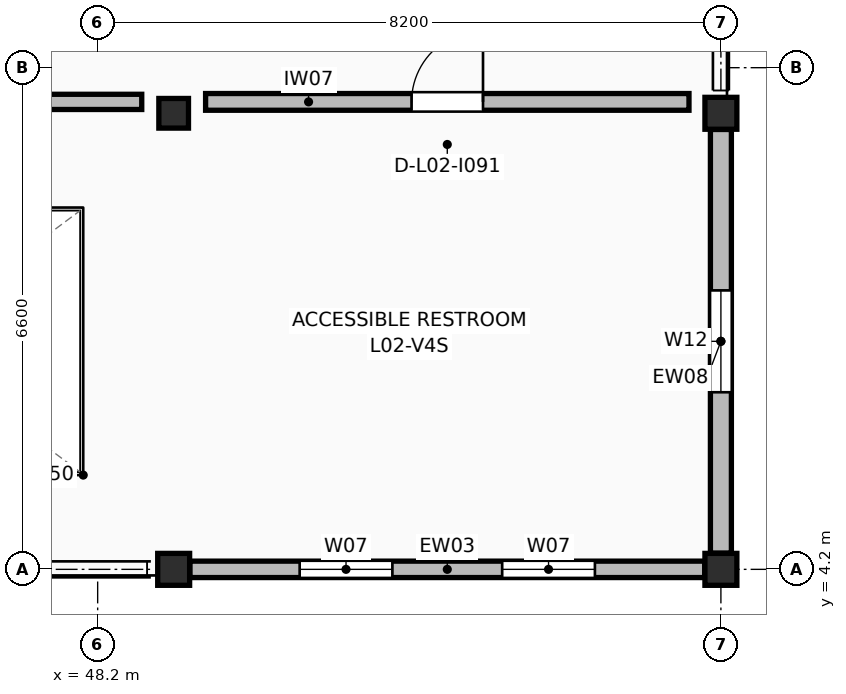
"""IFC4 building model, lengths in metres.
Left out: names, types, materials, properties, quantities, classifications, styles, units other than length and angle.
Written with IfcOpenShell. Run it as: python <this file> out.ifc"""

import sys

from ifc_helpers import new_model, si_unit, direction, frame, frame_2d, origin, origin_2d, place, context, subcontext, project, spatial, rectangle, extrude, element, fill, save


model = new_model("IFC4")
c1 = context("Model", 3, precision=1e-05, world=origin(), true_north=direction((0.0, 1.0)))
c2 = subcontext(c1, "Body", "Model", "MODEL_VIEW")
j1 = project(units=[si_unit("LENGTHUNIT", "METRE"), si_unit("PLANEANGLEUNIT", "RADIAN")], contexts=[c1])
p1 = place(None, origin())
s1 = spatial("IfcSite", under=j1, at=p1, CompositionType="ELEMENT")
p2 = place(p1, origin())
s2 = spatial("IfcBuilding", under=s1, at=p2, CompositionType="ELEMENT")
p3 = place(p2, frame((0.0, 0.0, 8.16)))
s3 = spatial("IfcBuildingStorey", under=s2, at=p3, CompositionType="ELEMENT", Elevation=8.16)
p4 = place(p3, frame((49.2, 4.2, 0.0), z_axis=(0.0, 0.0, 1.0), x_axis=(1.0, 0.0, 0.0)))
e1 = element("IfcColumn", 1, at=p4, inside=s3, PredefinedType="COLUMN", context=c2, shape_type="SweptSolid", body=[
    extrude(rectangle(XDim=0.42, YDim=0.42, at=origin_2d()), origin(), (0.0, 0.0, 1.0), 3.74),
])
p5 = place(p3, frame((49.2, 10.2, 0.0), z_axis=(0.0, 0.0, 1.0), x_axis=(1.0, 0.0, 0.0)))
e2 = element("IfcColumn", 2, at=p5, inside=s3, PredefinedType="COLUMN", context=c2, shape_type="SweptSolid", body=[
    extrude(rectangle(XDim=0.39, YDim=0.39, at=origin_2d()), origin(), (0.0, 0.0, 1.0), 3.74),
])
for number, where, z_axis, x_axis in (
    (3, (56.4, 4.2, 0.0), (0.0, 0.0, 1.0), (1.0, 0.0, 0.0)),
    (4, (56.4, 10.2, 0.0), (0.0, 0.0, 1.0), (1.0, 0.0, 0.0)),
):
    element("IfcColumn", number, at=place(p3, frame(where, z_axis=z_axis, x_axis=x_axis)), inside=s3, PredefinedType="COLUMN", context=c2, shape_type="SweptSolid", body=[
        extrude(rectangle(XDim=0.42, YDim=0.42, at=origin_2d()), origin(), (0.0, 0.0, 1.0), 3.74),
    ])
p6 = place(p3, frame((49.413, 4.2, 0.0), z_axis=(0.0, 0.0, 1.0), x_axis=(1.0, 0.0, 0.0)))
e5 = element("IfcWall", 5, at=p6, inside=s3, PredefinedType="STANDARD", context=c2, shape_type="SweptSolid", body=[
    extrude(rectangle(XDim=6.774, YDim=0.216, at=frame_2d((3.387, 0.0))), origin(), (0.0, 0.0, 1.0), 2.78),
])
p7 = place(p6, frame((1.445, 0.0, 0.95)))
e6 = element("IfcOpeningElement", 6, at=p7, cuts=e5, PredefinedType="OPENING", context=c2, shape_type="SweptSolid", body=[
    extrude(rectangle(XDim=1.22, YDim=1.45, at=frame_2d((0.61, 0.725))), frame((0.0, 0.118, 0.0), z_axis=(0.0, -1.0, 0.0), x_axis=(1.0, 0.0, 0.0)), (0.0, 0.0, 1.0), 0.236),
])
p8 = place(p6, frame((4.109, 0.0, 0.95)))
e7 = element("IfcOpeningElement", 7, at=p8, cuts=e5, PredefinedType="OPENING", context=c2, shape_type="SweptSolid", body=[
    extrude(rectangle(XDim=1.22, YDim=1.45, at=frame_2d((0.61, 0.725))), frame((0.0, 0.118, 0.0), z_axis=(0.0, -1.0, 0.0), x_axis=(1.0, 0.0, 0.0)), (0.0, 0.0, 1.0), 0.236),
])
p9 = place(p3, frame((56.4, 4.413, 0.0), z_axis=(0.0, 0.0, 1.0), x_axis=(0.0, 1.0, 0.0)))
e8 = element("IfcWall", 8, at=p9, inside=s3, PredefinedType="STANDARD", context=c2, shape_type="SweptSolid", body=[
    extrude(rectangle(XDim=5.574, YDim=0.276, at=frame_2d((2.787, 0.0))), origin(), (0.0, 0.0, 1.0), 2.78),
])
p10 = place(p9, frame((2.117, 0.0, 0.95)))
e9 = element("IfcOpeningElement", 9, at=p10, cuts=e8, PredefinedType="OPENING", context=c2, shape_type="SweptSolid", body=[
    extrude(rectangle(XDim=1.34, YDim=1.6, at=frame_2d((0.67, 0.8))), frame((0.0, 0.148, 0.0), z_axis=(0.0, -1.0, 0.0), x_axis=(1.0, 0.0, 0.0)), (0.0, 0.0, 1.0), 0.296),
])
p11 = place(p3, frame((41.72, 10.35, 0.0), z_axis=(0.0, 0.0, 1.0), x_axis=(1.0, 0.0, 0.0)))
e10 = element("IfcWall", 10, at=p11, inside=s3, PredefinedType="STANDARD", context=c2, shape_type="SweptSolid", body=[
    extrude(rectangle(XDim=7.06, YDim=0.2, at=frame_2d((3.53, 0.0))), origin(), (0.0, 0.0, 1.0), 2.75),
])
p12 = place(p3, frame((49.62, 10.35, 0.0), z_axis=(0.0, 0.0, 1.0), x_axis=(1.0, 0.0, 0.0)))
e11 = element("IfcWall", 11, at=p12, inside=s3, PredefinedType="STANDARD", context=c2, shape_type="SweptSolid", body=[
    extrude(rectangle(XDim=6.36, YDim=0.22, at=frame_2d((3.18, 0.0))), origin(), (0.0, 0.0, 1.0), 2.75),
])
p13 = place(p12, frame((2.71, 0.0, 0.0)))
e12 = element("IfcOpeningElement", 12, at=p13, cuts=e11, PredefinedType="OPENING", context=c2, shape_type="SweptSolid", body=[
    extrude(rectangle(XDim=0.94, YDim=2.24, at=frame_2d((0.47, 1.12))), frame((0.0, 0.12, 0.0), z_axis=(0.0, -1.0, 0.0), x_axis=(1.0, 0.0, 0.0)), (0.0, 0.0, 1.0), 0.24),
])
p14 = place(p7, origin())
e13 = element("IfcWindow", 13, at=p14, inside=s3, PartitioningType="SINGLE_PANEL", PredefinedType="WINDOW", context=c2, shape_type="SweptSolid", body=[
    extrude(rectangle(XDim=1.22, YDim=1.45, at=frame_2d((0.61, 0.725))), frame((0.0, 0.03, 0.0), z_axis=(0.0, -1.0, 0.0), x_axis=(1.0, 0.0, 0.0)), (0.0, 0.0, 1.0), 0.06),
])
fill(e6, e13)
p15 = place(p8, origin())
e14 = element("IfcWindow", 14, at=p15, inside=s3, PartitioningType="SINGLE_PANEL", PredefinedType="WINDOW", context=c2, shape_type="SweptSolid", body=[
    extrude(rectangle(XDim=1.22, YDim=1.45, at=frame_2d((0.61, 0.725))), frame((0.0, 0.03, 0.0), z_axis=(0.0, -1.0, 0.0), x_axis=(1.0, 0.0, 0.0)), (0.0, 0.0, 1.0), 0.06),
])
fill(e7, e14)
p16 = place(p10, origin())
e15 = element("IfcWindow", 15, at=p16, inside=s3, PartitioningType="SINGLE_PANEL", PredefinedType="WINDOW", context=c2, shape_type="SweptSolid", body=[
    extrude(rectangle(XDim=1.34, YDim=1.6, at=frame_2d((0.67, 0.8))), frame((0.0, 0.03, 0.0), z_axis=(0.0, -1.0, 0.0), x_axis=(1.0, 0.0, 0.0)), (0.0, 0.0, 1.0), 0.06),
])
fill(e9, e15)
p17 = place(p13, origin())
e16 = element("IfcDoor", 16, at=p17, inside=s3, OperationType="SINGLE_SWING_RIGHT", PredefinedType="DOOR", context=c2, shape_type="SweptSolid", body=[
    extrude(rectangle(XDim=0.94, YDim=2.24, at=frame_2d((0.47, 1.12))), frame((0.0, 0.025, 0.0), z_axis=(0.0, -1.0, 0.0), x_axis=(1.0, 0.0, 0.0)), (0.0, 0.0, 1.0), 0.05),
])
fill(e12, e16)
save(model, sys.argv[1])
